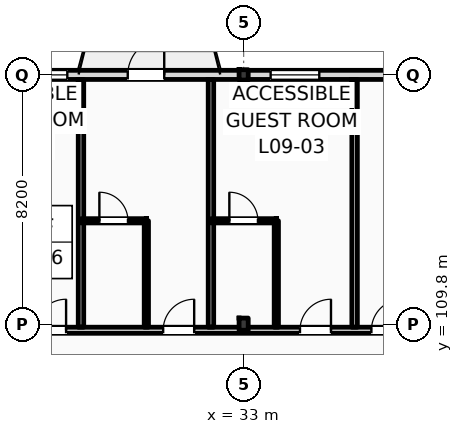
"""IFC4 building model, lengths in metres.
Left out: names, types, materials, properties, quantities, classifications, styles, units other than length and angle.
Written with IfcOpenShell. Run it as: python <this file> out.ifc"""

import sys

from ifc_helpers import new_model, si_unit, direction, frame, frame_2d, origin, origin_2d, place, context, subcontext, project, spatial, rectangle, i_section, extrude, element, fill, save


model = new_model("IFC4")
c1 = context("Model", 3, precision=1e-05, world=origin(), true_north=direction((0.0, 1.0)))
c2 = subcontext(c1, "Body", "Model", "MODEL_VIEW")
j1 = project(units=[si_unit("LENGTHUNIT", "METRE"), si_unit("PLANEANGLEUNIT", "RADIAN")], contexts=[c1])
p1 = place(None, origin())
s1 = spatial("IfcSite", under=j1, at=p1, CompositionType="ELEMENT")
p2 = place(p1, origin())
s2 = spatial("IfcBuilding", under=s1, at=p2, CompositionType="ELEMENT")
p3 = place(p2, frame((0.0, 0.0, 39.0)))
s3 = spatial("IfcBuildingStorey", under=s2, at=p3, CompositionType="ELEMENT", Elevation=39.0)
p4 = place(p3, frame((33.0, 109.8, 0.0), z_axis=(0.0, 0.0, 1.0), x_axis=(1.0, 0.0, 0.0)))
e1 = element("IfcColumn", 1, at=p4, inside=s3, PredefinedType="COLUMN", context=c2, shape_type="SweptSolid", body=[
    extrude(i_section(OverallWidth=0.3, OverallDepth=0.4, WebThickness=0.013, FlangeThickness=0.024, FilletRadius=0.027, at=origin_2d()), origin(), (0.0, 0.0, 1.0), 3.6),
])
p5 = place(p3, frame((33.0, 118.0, 0.0), z_axis=(0.0, 0.0, 1.0), x_axis=(1.0, 0.0, 0.0)))
e2 = element("IfcColumn", 2, at=p5, inside=s3, PredefinedType="COLUMN", context=c2, shape_type="SweptSolid", body=[
    extrude(i_section(OverallWidth=0.3, OverallDepth=0.34, WebThickness=0.012, FlangeThickness=0.021, FilletRadius=0.027, at=origin_2d()), origin(), (0.0, 0.0, 1.0), 3.6),
])
p6 = place(p3, frame((22.5, 118.0, 0.0), z_axis=(0.0, 0.0, 1.0), x_axis=(1.0, 0.0, 0.0)))
e3 = element("IfcWall", 3, at=p6, inside=s3, PredefinedType="STANDARD", context=c2, shape_type="SweptSolid", body=[
    extrude(rectangle(XDim=72.9, YDim=0.3, at=frame_2d((36.45, 0.0))), origin(), (0.0, 0.0, 1.0), 2.92),
])
p7 = place(p6, frame((3.6, 0.0, 0.9)))
e4 = element("IfcOpeningElement", 4, at=p7, cuts=e3, PredefinedType="OPENING", context=c2, shape_type="SweptSolid", body=[
    extrude(rectangle(XDim=1.1, YDim=1.6, at=frame_2d((0.55, 0.8))), frame((0.0, 0.16, 0.0), z_axis=(0.0, -1.0, 0.0), x_axis=(1.0, 0.0, 0.0)), (0.0, 0.0, 1.0), 0.32),
])
p8 = place(p6, frame((6.688, 0.0, 0.0)))
e5 = element("IfcOpeningElement", 5, at=p8, cuts=e3, PredefinedType="OPENING", context=c2, shape_type="SweptSolid", body=[
    extrude(rectangle(XDim=1.2, YDim=2.25, at=frame_2d((0.6, 1.125))), frame((0.0, 0.16, 0.0), z_axis=(0.0, -1.0, 0.0), x_axis=(1.0, 0.0, 0.0)), (0.0, 0.0, 1.0), 0.32),
])
p9 = place(p6, frame((11.388, 0.0, 0.9)))
e6 = element("IfcOpeningElement", 6, at=p9, cuts=e3, PredefinedType="OPENING", context=c2, shape_type="SweptSolid", body=[
    extrude(rectangle(XDim=1.6, YDim=1.75, at=frame_2d((0.8, 0.875))), frame((0.0, 0.16, 0.0), z_axis=(0.0, -1.0, 0.0), x_axis=(1.0, 0.0, 0.0)), (0.0, 0.0, 1.0), 0.32),
])
p10 = place(p6, frame((15.413, 0.0, 0.9)))
e7 = element("IfcOpeningElement", 7, at=p10, cuts=e3, PredefinedType="OPENING", context=c2, shape_type="SweptSolid", body=[
    extrude(rectangle(XDim=1.75, YDim=1.84, at=frame_2d((0.875, 0.92))), frame((0.0, 0.16, 0.0), z_axis=(0.0, -1.0, 0.0), x_axis=(1.0, 0.0, 0.0)), (0.0, 0.0, 1.0), 0.32),
])
p11 = place(p6, frame((21.245, 0.0, 0.0)))
e8 = element("IfcOpeningElement", 8, at=p11, cuts=e3, PredefinedType="OPENING", context=c2, shape_type="SweptSolid", body=[
    extrude(rectangle(XDim=1.2, YDim=2.25, at=frame_2d((0.6, 1.125))), frame((0.0, 0.16, 0.0), z_axis=(0.0, -1.0, 0.0), x_axis=(1.0, 0.0, 0.0)), (0.0, 0.0, 1.0), 0.32),
])
p12 = place(p6, frame((23.705, 0.0, 0.0)))
e9 = element("IfcOpeningElement", 9, at=p12, cuts=e3, PredefinedType="OPENING", context=c2, shape_type="SweptSolid", body=[
    extrude(rectangle(XDim=1.2, YDim=2.25, at=frame_2d((0.6, 1.125))), frame((0.0, 0.16, 0.0), z_axis=(0.0, -1.0, 0.0), x_axis=(1.0, 0.0, 0.0)), (0.0, 0.0, 1.0), 0.32),
])
p13 = place(p6, frame((28.488, 0.0, 0.9)))
e10 = element("IfcOpeningElement", 10, at=p13, cuts=e3, PredefinedType="OPENING", context=c2, shape_type="SweptSolid", body=[
    extrude(rectangle(XDim=2.6, YDim=1.84, at=frame_2d((1.3, 0.92))), frame((0.0, 0.16, 0.0), z_axis=(0.0, -1.0, 0.0), x_axis=(1.0, 0.0, 0.0)), (0.0, 0.0, 1.0), 0.32),
])
p14 = place(p6, frame((34.76, 0.0, 0.9)))
e11 = element("IfcOpeningElement", 11, at=p14, cuts=e3, PredefinedType="OPENING", context=c2, shape_type="SweptSolid", body=[
    extrude(rectangle(XDim=1.1, YDim=1.84, at=frame_2d((0.55, 0.92))), frame((0.0, 0.16, 0.0), z_axis=(0.0, -1.0, 0.0), x_axis=(1.0, 0.0, 0.0)), (0.0, 0.0, 1.0), 0.32),
])
p15 = place(p6, frame((38.143, 0.0, 0.0)))
e12 = element("IfcOpeningElement", 12, at=p15, cuts=e3, PredefinedType="OPENING", context=c2, shape_type="SweptSolid", body=[
    extrude(rectangle(XDim=1.2, YDim=2.25, at=frame_2d((0.6, 1.125))), frame((0.0, 0.16, 0.0), z_axis=(0.0, -1.0, 0.0), x_axis=(1.0, 0.0, 0.0)), (0.0, 0.0, 1.0), 0.32),
])
p16 = place(p6, frame((42.687, 0.0, 0.9)))
e13 = element("IfcOpeningElement", 13, at=p16, cuts=e3, PredefinedType="OPENING", context=c2, shape_type="SweptSolid", body=[
    extrude(rectangle(XDim=1.2, YDim=1.8, at=frame_2d((0.6, 0.9))), frame((0.0, 0.16, 0.0), z_axis=(0.0, -1.0, 0.0), x_axis=(1.0, 0.0, 0.0)), (0.0, 0.0, 1.0), 0.32),
])
p17 = place(p6, frame((47.112, 0.0, 0.9)))
e14 = element("IfcOpeningElement", 14, at=p17, cuts=e3, PredefinedType="OPENING", context=c2, shape_type="SweptSolid", body=[
    extrude(rectangle(XDim=1.35, YDim=1.84, at=frame_2d((0.675, 0.92))), frame((0.0, 0.16, 0.0), z_axis=(0.0, -1.0, 0.0), x_axis=(1.0, 0.0, 0.0)), (0.0, 0.0, 1.0), 0.32),
])
p18 = place(p6, frame((52.482, 0.0, 0.0)))
e15 = element("IfcOpeningElement", 15, at=p18, cuts=e3, PredefinedType="OPENING", context=c2, shape_type="SweptSolid", body=[
    extrude(rectangle(XDim=1.2, YDim=2.25, at=frame_2d((0.6, 1.125))), frame((0.0, 0.16, 0.0), z_axis=(0.0, -1.0, 0.0), x_axis=(1.0, 0.0, 0.0)), (0.0, 0.0, 1.0), 0.32),
])
p19 = place(p6, frame((54.942, 0.0, 0.0)))
e16 = element("IfcOpeningElement", 16, at=p19, cuts=e3, PredefinedType="OPENING", context=c2, shape_type="SweptSolid", body=[
    extrude(rectangle(XDim=1.2, YDim=2.25, at=frame_2d((0.6, 1.125))), frame((0.0, 0.16, 0.0), z_axis=(0.0, -1.0, 0.0), x_axis=(1.0, 0.0, 0.0)), (0.0, 0.0, 1.0), 0.32),
])
p20 = place(p6, frame((60.387, 0.0, 0.9)))
e17 = element("IfcOpeningElement", 17, at=p20, cuts=e3, PredefinedType="OPENING", context=c2, shape_type="SweptSolid", body=[
    extrude(rectangle(XDim=1.8, YDim=1.84, at=frame_2d((0.9, 0.92))), frame((0.0, 0.16, 0.0), z_axis=(0.0, -1.0, 0.0), x_axis=(1.0, 0.0, 0.0)), (0.0, 0.0, 1.0), 0.32),
])
p21 = place(p6, frame((66.013, 0.0, 0.9)))
e18 = element("IfcOpeningElement", 18, at=p21, cuts=e3, PredefinedType="OPENING", context=c2, shape_type="SweptSolid", body=[
    extrude(rectangle(XDim=1.35, YDim=1.84, at=frame_2d((0.675, 0.92))), frame((0.0, 0.16, 0.0), z_axis=(0.0, -1.0, 0.0), x_axis=(1.0, 0.0, 0.0)), (0.0, 0.0, 1.0), 0.32),
])
p22 = place(p6, frame((69.275, 0.0, 0.9)))
e19 = element("IfcOpeningElement", 19, at=p22, cuts=e3, PredefinedType="OPENING", context=c2, shape_type="SweptSolid", body=[
    extrude(rectangle(XDim=2.1, YDim=1.84, at=frame_2d((1.05, 0.92))), frame((0.0, 0.16, 0.0), z_axis=(0.0, -1.0, 0.0), x_axis=(1.0, 0.0, 0.0)), (0.0, 0.0, 1.0), 0.32),
])
p23 = place(p3, frame((10.65, 109.6, 0.0), z_axis=(0.0, 0.0, 1.0), x_axis=(1.0, 0.0, 0.0)))
e20 = element("IfcWall", 20, at=p23, inside=s3, PredefinedType="PARTITIONING", context=c2, shape_type="SweptSolid", body=[
    extrude(rectangle(XDim=84.61, YDim=0.2, at=frame_2d((42.305, 0.0))), origin(), (0.0, 0.0, 1.0), 2.82),
])
p24 = place(p23, frame((15.49, 0.0, 0.0)))
e21 = element("IfcOpeningElement", 21, at=p24, cuts=e20, PredefinedType="OPENING", context=c2, shape_type="SweptSolid", body=[
    extrude(rectangle(XDim=1.02, YDim=2.2, at=frame_2d((0.51, 1.1))), frame((0.0, 0.11, 0.0), z_axis=(0.0, -1.0, 0.0), x_axis=(1.0, 0.0, 0.0)), (0.0, 0.0, 1.0), 0.22),
])
p25 = place(p23, frame((19.703, 0.0, 0.0)))
e22 = element("IfcOpeningElement", 22, at=p25, cuts=e20, PredefinedType="OPENING", context=c2, shape_type="SweptSolid", body=[
    extrude(rectangle(XDim=1.02, YDim=2.2, at=frame_2d((0.51, 1.1))), frame((0.0, 0.11, 0.0), z_axis=(0.0, -1.0, 0.0), x_axis=(1.0, 0.0, 0.0)), (0.0, 0.0, 1.0), 0.22),
])
p26 = place(p23, frame((24.203, 0.0, 0.0)))
e23 = element("IfcOpeningElement", 23, at=p26, cuts=e20, PredefinedType="OPENING", context=c2, shape_type="SweptSolid", body=[
    extrude(rectangle(XDim=1.02, YDim=2.2, at=frame_2d((0.51, 1.1))), frame((0.0, 0.11, 0.0), z_axis=(0.0, -1.0, 0.0), x_axis=(1.0, 0.0, 0.0)), (0.0, 0.0, 1.0), 0.22),
])
p27 = place(p23, frame((26.552, 0.0, 0.0)))
e24 = element("IfcOpeningElement", 24, at=p27, cuts=e20, PredefinedType="OPENING", context=c2, shape_type="SweptSolid", body=[
    extrude(rectangle(XDim=1.02, YDim=2.2, at=frame_2d((0.51, 1.1))), frame((0.0, 0.11, 0.0), z_axis=(0.0, -1.0, 0.0), x_axis=(1.0, 0.0, 0.0)), (0.0, 0.0, 1.0), 0.22),
])
p28 = place(p23, frame((33.233, 0.0, 0.0)))
e25 = element("IfcOpeningElement", 25, at=p28, cuts=e20, PredefinedType="OPENING", context=c2, shape_type="SweptSolid", body=[
    extrude(rectangle(XDim=0.96, YDim=2.2, at=frame_2d((0.48, 1.1))), frame((0.0, 0.11, 0.0), z_axis=(0.0, -1.0, 0.0), x_axis=(1.0, 0.0, 0.0)), (0.0, 0.0, 1.0), 0.22),
])
p29 = place(p23, frame((35.583, 0.0, 0.0)))
e26 = element("IfcOpeningElement", 26, at=p29, cuts=e20, PredefinedType="OPENING", context=c2, shape_type="SweptSolid", body=[
    extrude(rectangle(XDim=0.96, YDim=2.2, at=frame_2d((0.48, 1.1))), frame((0.0, 0.11, 0.0), z_axis=(0.0, -1.0, 0.0), x_axis=(1.0, 0.0, 0.0)), (0.0, 0.0, 1.0), 0.22),
])
p30 = place(p23, frame((42.233, 0.0, 0.0)))
e27 = element("IfcOpeningElement", 27, at=p30, cuts=e20, PredefinedType="OPENING", context=c2, shape_type="SweptSolid", body=[
    extrude(rectangle(XDim=0.96, YDim=2.2, at=frame_2d((0.48, 1.1))), frame((0.0, 0.11, 0.0), z_axis=(0.0, -1.0, 0.0), x_axis=(1.0, 0.0, 0.0)), (0.0, 0.0, 1.0), 0.22),
])
p31 = place(p23, frame((46.983, 0.0, 0.0)))
e28 = element("IfcOpeningElement", 28, at=p31, cuts=e20, PredefinedType="OPENING", context=c2, shape_type="SweptSolid", body=[
    extrude(rectangle(XDim=0.96, YDim=2.2, at=frame_2d((0.48, 1.1))), frame((0.0, 0.11, 0.0), z_axis=(0.0, -1.0, 0.0), x_axis=(1.0, 0.0, 0.0)), (0.0, 0.0, 1.0), 0.22),
])
p32 = place(p23, frame((51.233, 0.0, 0.0)))
e29 = element("IfcOpeningElement", 29, at=p32, cuts=e20, PredefinedType="OPENING", context=c2, shape_type="SweptSolid", body=[
    extrude(rectangle(XDim=0.96, YDim=2.2, at=frame_2d((0.48, 1.1))), frame((0.0, 0.11, 0.0), z_axis=(0.0, -1.0, 0.0), x_axis=(1.0, 0.0, 0.0)), (0.0, 0.0, 1.0), 0.22),
])
p33 = place(p23, frame((55.733, 0.0, 0.0)))
e30 = element("IfcOpeningElement", 30, at=p33, cuts=e20, PredefinedType="OPENING", context=c2, shape_type="SweptSolid", body=[
    extrude(rectangle(XDim=0.96, YDim=2.2, at=frame_2d((0.48, 1.1))), frame((0.0, 0.11, 0.0), z_axis=(0.0, -1.0, 0.0), x_axis=(1.0, 0.0, 0.0)), (0.0, 0.0, 1.0), 0.22),
])
p34 = place(p23, frame((58.083, 0.0, 0.0)))
e31 = element("IfcOpeningElement", 31, at=p34, cuts=e20, PredefinedType="OPENING", context=c2, shape_type="SweptSolid", body=[
    extrude(rectangle(XDim=0.96, YDim=2.2, at=frame_2d((0.48, 1.1))), frame((0.0, 0.11, 0.0), z_axis=(0.0, -1.0, 0.0), x_axis=(1.0, 0.0, 0.0)), (0.0, 0.0, 1.0), 0.22),
])
p35 = place(p23, frame((64.732, 0.0, 0.0)))
e32 = element("IfcOpeningElement", 32, at=p35, cuts=e20, PredefinedType="OPENING", context=c2, shape_type="SweptSolid", body=[
    extrude(rectangle(XDim=0.96, YDim=2.2, at=frame_2d((0.48, 1.1))), frame((0.0, 0.11, 0.0), z_axis=(0.0, -1.0, 0.0), x_axis=(1.0, 0.0, 0.0)), (0.0, 0.0, 1.0), 0.22),
])
p36 = place(p23, frame((66.832, 0.0, 0.0)))
e33 = element("IfcOpeningElement", 33, at=p36, cuts=e20, PredefinedType="OPENING", context=c2, shape_type="SweptSolid", body=[
    extrude(rectangle(XDim=0.96, YDim=2.2, at=frame_2d((0.48, 1.1))), frame((0.0, 0.11, 0.0), z_axis=(0.0, -1.0, 0.0), x_axis=(1.0, 0.0, 0.0)), (0.0, 0.0, 1.0), 0.22),
])
p37 = place(p23, frame((73.732, 0.0, 0.0)))
e34 = element("IfcOpeningElement", 34, at=p37, cuts=e20, PredefinedType="OPENING", context=c2, shape_type="SweptSolid", body=[
    extrude(rectangle(XDim=0.96, YDim=2.2, at=frame_2d((0.48, 1.1))), frame((0.0, 0.11, 0.0), z_axis=(0.0, -1.0, 0.0), x_axis=(1.0, 0.0, 0.0)), (0.0, 0.0, 1.0), 0.22),
])
p38 = place(p23, frame((78.233, 0.0, 0.0)))
e35 = element("IfcOpeningElement", 35, at=p38, cuts=e20, PredefinedType="OPENING", context=c2, shape_type="SweptSolid", body=[
    extrude(rectangle(XDim=0.96, YDim=2.2, at=frame_2d((0.48, 1.1))), frame((0.0, 0.11, 0.0), z_axis=(0.0, -1.0, 0.0), x_axis=(1.0, 0.0, 0.0)), (0.0, 0.0, 1.0), 0.22),
])
p39 = place(p23, frame((80.62, 0.0, 0.0)))
e36 = element("IfcOpeningElement", 36, at=p39, cuts=e20, PredefinedType="OPENING", context=c2, shape_type="SweptSolid", body=[
    extrude(rectangle(XDim=0.96, YDim=2.2, at=frame_2d((0.48, 1.1))), frame((0.0, 0.11, 0.0), z_axis=(0.0, -1.0, 0.0), x_axis=(1.0, 0.0, 0.0)), (0.0, 0.0, 1.0), 0.22),
])
p40 = place(p23, frame((2.716, 0.0, 0.0)))
e37 = element("IfcOpeningElement", 37, at=p40, cuts=e20, PredefinedType="OPENING", context=c2, shape_type="SweptSolid", body=[
    extrude(rectangle(XDim=1.35, YDim=2.25, at=frame_2d((0.675, 1.125))), frame((0.0, 0.11, 0.0), z_axis=(0.0, -1.0, 0.0), x_axis=(1.0, 0.0, 0.0)), (0.0, 0.0, 1.0), 0.22),
])
p41 = place(p23, frame((6.65, 0.0, 0.0)))
e38 = element("IfcOpeningElement", 38, at=p41, cuts=e20, PredefinedType="OPENING", context=c2, shape_type="SweptSolid", body=[
    extrude(rectangle(XDim=1.35, YDim=2.25, at=frame_2d((0.675, 1.125))), frame((0.0, 0.11, 0.0), z_axis=(0.0, -1.0, 0.0), x_axis=(1.0, 0.0, 0.0)), (0.0, 0.0, 1.0), 0.22),
])
p42 = place(p23, frame((10.583, 0.0, 0.0)))
e39 = element("IfcOpeningElement", 39, at=p42, cuts=e20, PredefinedType="OPENING", context=c2, shape_type="SweptSolid", body=[
    extrude(rectangle(XDim=1.35, YDim=2.25, at=frame_2d((0.675, 1.125))), frame((0.0, 0.11, 0.0), z_axis=(0.0, -1.0, 0.0), x_axis=(1.0, 0.0, 0.0)), (0.0, 0.0, 1.0), 0.22),
])
p43 = place(p3, frame((27.65, 109.7, 0.0), z_axis=(0.0, 0.0, 1.0), x_axis=(0.0, 1.0, 0.0)))
e40 = element("IfcWall", 40, at=p43, inside=s3, PredefinedType="PARTITIONING", context=c2, shape_type="SweptSolid", body=[
    extrude(rectangle(XDim=8.15, YDim=0.18, at=frame_2d((4.075, 0.0))), origin(), (0.0, 0.0, 1.0), 3.07),
])
p44 = place(p3, frame((31.925, 109.7, 0.0), z_axis=(0.0, 0.0, 1.0), x_axis=(0.0, 1.0, 0.0)))
e41 = element("IfcWall", 41, at=p44, inside=s3, PredefinedType="PARTITIONING", context=c2, shape_type="SweptSolid", body=[
    extrude(rectangle(XDim=8.15, YDim=0.18, at=frame_2d((4.075, 0.0))), origin(), (0.0, 0.0, 1.0), 3.38),
])
p45 = place(p3, frame((29.8, 109.7, 0.0), z_axis=(0.0, 0.0, 1.0), x_axis=(0.0, 1.0, 0.0)))
e42 = element("IfcWall", 42, at=p45, inside=s3, PredefinedType="PARTITIONING", context=c2, shape_type="SweptSolid", body=[
    extrude(rectangle(XDim=3.5, YDim=0.14, at=frame_2d((1.75, 0.0))), origin(), (0.0, 0.0, 1.0), 3.38),
])
p46 = place(p3, frame((27.65, 113.2, 0.0), z_axis=(0.0, 0.0, 1.0), x_axis=(1.0, 0.0, 0.0)))
e43 = element("IfcWall", 43, at=p46, inside=s3, PredefinedType="PARTITIONING", context=c2, shape_type="SweptSolid", body=[
    extrude(rectangle(XDim=2.15, YDim=0.14, at=frame_2d((1.075, 0.0))), origin(), (0.0, 0.0, 1.0), 3.38),
])
p47 = place(p46, frame((0.605, 0.0, 0.0)))
e44 = element("IfcOpeningElement", 44, at=p47, cuts=e43, PredefinedType="OPENING", context=c2, shape_type="SweptSolid", body=[
    extrude(rectangle(XDim=0.94, YDim=2.15, at=frame_2d((0.47, 1.075))), frame((0.0, 0.08, 0.0), z_axis=(0.0, -1.0, 0.0), x_axis=(1.0, 0.0, 0.0)), (0.0, 0.0, 1.0), 0.16),
])
p48 = place(p3, frame((36.65, 109.7, 0.0), z_axis=(0.0, 0.0, 1.0), x_axis=(0.0, 1.0, 0.0)))
e45 = element("IfcWall", 45, at=p48, inside=s3, PredefinedType="PARTITIONING", context=c2, shape_type="SweptSolid", body=[
    extrude(rectangle(XDim=8.15, YDim=0.18, at=frame_2d((4.075, 0.0))), origin(), (0.0, 0.0, 1.0), 3.38),
])
p49 = place(p3, frame((34.075, 109.7, 0.0), z_axis=(0.0, 0.0, 1.0), x_axis=(0.0, 1.0, 0.0)))
e46 = element("IfcWall", 46, at=p49, inside=s3, PredefinedType="PARTITIONING", context=c2, shape_type="SweptSolid", body=[
    extrude(rectangle(XDim=3.5, YDim=0.14, at=frame_2d((1.75, 0.0))), origin(), (0.0, 0.0, 1.0), 3.38),
])
p50 = place(p3, frame((31.925, 113.2, 0.0), z_axis=(0.0, 0.0, 1.0), x_axis=(1.0, 0.0, 0.0)))
e47 = element("IfcWall", 47, at=p50, inside=s3, PredefinedType="PARTITIONING", context=c2, shape_type="SweptSolid", body=[
    extrude(rectangle(XDim=2.15, YDim=0.14, at=frame_2d((1.075, 0.0))), origin(), (0.0, 0.0, 1.0), 3.38),
])
p51 = place(p50, frame((0.605, 0.0, 0.0)))
e48 = element("IfcOpeningElement", 48, at=p51, cuts=e47, PredefinedType="OPENING", context=c2, shape_type="SweptSolid", body=[
    extrude(rectangle(XDim=0.94, YDim=2.15, at=frame_2d((0.47, 1.075))), frame((0.0, 0.08, 0.0), z_axis=(0.0, -1.0, 0.0), x_axis=(1.0, 0.0, 0.0)), (0.0, 0.0, 1.0), 0.16),
])
p52 = place(p7, origin())
e49 = element("IfcWindow", 49, at=p52, inside=s3, PartitioningType="DOUBLE_PANEL_VERTICAL", PredefinedType="WINDOW", context=c2, shape_type="SweptSolid", body=[
    extrude(rectangle(XDim=1.1, YDim=1.6, at=frame_2d((0.55, 0.8))), frame((0.0, 0.03, 0.0), z_axis=(0.0, -1.0, 0.0), x_axis=(1.0, 0.0, 0.0)), (0.0, 0.0, 1.0), 0.06),
])
fill(e4, e49)
p53 = place(p8, origin())
e50 = element("IfcDoor", 50, at=p53, inside=s3, OperationType="SINGLE_SWING_RIGHT", PredefinedType="DOOR", context=c2, shape_type="SweptSolid", body=[
    extrude(rectangle(XDim=1.2, YDim=2.25, at=frame_2d((0.6, 1.125))), frame((0.0, 0.025, 0.0), z_axis=(0.0, -1.0, 0.0), x_axis=(1.0, 0.0, 0.0)), (0.0, 0.0, 1.0), 0.05),
])
fill(e5, e50)
p54 = place(p9, origin())
e51 = element("IfcWindow", 51, at=p54, inside=s3, PartitioningType="DOUBLE_PANEL_VERTICAL", PredefinedType="WINDOW", context=c2, shape_type="SweptSolid", body=[
    extrude(rectangle(XDim=1.6, YDim=1.75, at=frame_2d((0.8, 0.875))), frame((0.0, 0.03, 0.0), z_axis=(0.0, -1.0, 0.0), x_axis=(1.0, 0.0, 0.0)), (0.0, 0.0, 1.0), 0.06),
])
fill(e6, e51)
p55 = place(p24, origin())
e52 = element("IfcDoor", 52, at=p55, inside=s3, OperationType="SINGLE_SWING_RIGHT", PredefinedType="DOOR", context=c2, shape_type="SweptSolid", body=[
    extrude(rectangle(XDim=1.02, YDim=2.2, at=frame_2d((0.51, 1.1))), frame((0.0, 0.025, 0.0), z_axis=(0.0, -1.0, 0.0), x_axis=(1.0, 0.0, 0.0)), (0.0, 0.0, 1.0), 0.05),
])
fill(e21, e52)
p56 = place(p25, origin())
e53 = element("IfcDoor", 53, at=p56, inside=s3, OperationType="SINGLE_SWING_RIGHT", PredefinedType="DOOR", context=c2, shape_type="SweptSolid", body=[
    extrude(rectangle(XDim=1.02, YDim=2.2, at=frame_2d((0.51, 1.1))), frame((0.0, 0.025, 0.0), z_axis=(0.0, -1.0, 0.0), x_axis=(1.0, 0.0, 0.0)), (0.0, 0.0, 1.0), 0.05),
])
fill(e22, e53)
p57 = place(p47, origin())
e54 = element("IfcDoor", 54, at=p57, inside=s3, OperationType="SINGLE_SWING_LEFT", PredefinedType="DOOR", context=c2, shape_type="SweptSolid", body=[
    extrude(rectangle(XDim=0.94, YDim=2.15, at=frame_2d((0.47, 1.075))), frame((0.0, 0.025, 0.0), z_axis=(0.0, -1.0, 0.0), x_axis=(1.0, 0.0, 0.0)), (0.0, 0.0, 1.0), 0.05),
])
fill(e44, e54)
p58 = place(p26, origin())
e55 = element("IfcDoor", 55, at=p58, inside=s3, OperationType="SINGLE_SWING_RIGHT", PredefinedType="DOOR", context=c2, shape_type="SweptSolid", body=[
    extrude(rectangle(XDim=1.02, YDim=2.2, at=frame_2d((0.51, 1.1))), frame((0.0, 0.025, 0.0), z_axis=(0.0, -1.0, 0.0), x_axis=(1.0, 0.0, 0.0)), (0.0, 0.0, 1.0), 0.05),
])
fill(e23, e55)
p59 = place(p51, origin())
e56 = element("IfcDoor", 56, at=p59, inside=s3, OperationType="SINGLE_SWING_LEFT", PredefinedType="DOOR", context=c2, shape_type="SweptSolid", body=[
    extrude(rectangle(XDim=0.94, YDim=2.15, at=frame_2d((0.47, 1.075))), frame((0.0, 0.025, 0.0), z_axis=(0.0, -1.0, 0.0), x_axis=(1.0, 0.0, 0.0)), (0.0, 0.0, 1.0), 0.05),
])
fill(e48, e56)
p60 = place(p27, origin())
e57 = element("IfcDoor", 57, at=p60, inside=s3, OperationType="SINGLE_SWING_RIGHT", PredefinedType="DOOR", context=c2, shape_type="SweptSolid", body=[
    extrude(rectangle(XDim=1.02, YDim=2.2, at=frame_2d((0.51, 1.1))), frame((0.0, 0.025, 0.0), z_axis=(0.0, -1.0, 0.0), x_axis=(1.0, 0.0, 0.0)), (0.0, 0.0, 1.0), 0.05),
])
fill(e24, e57)
save(model, sys.argv[1])
